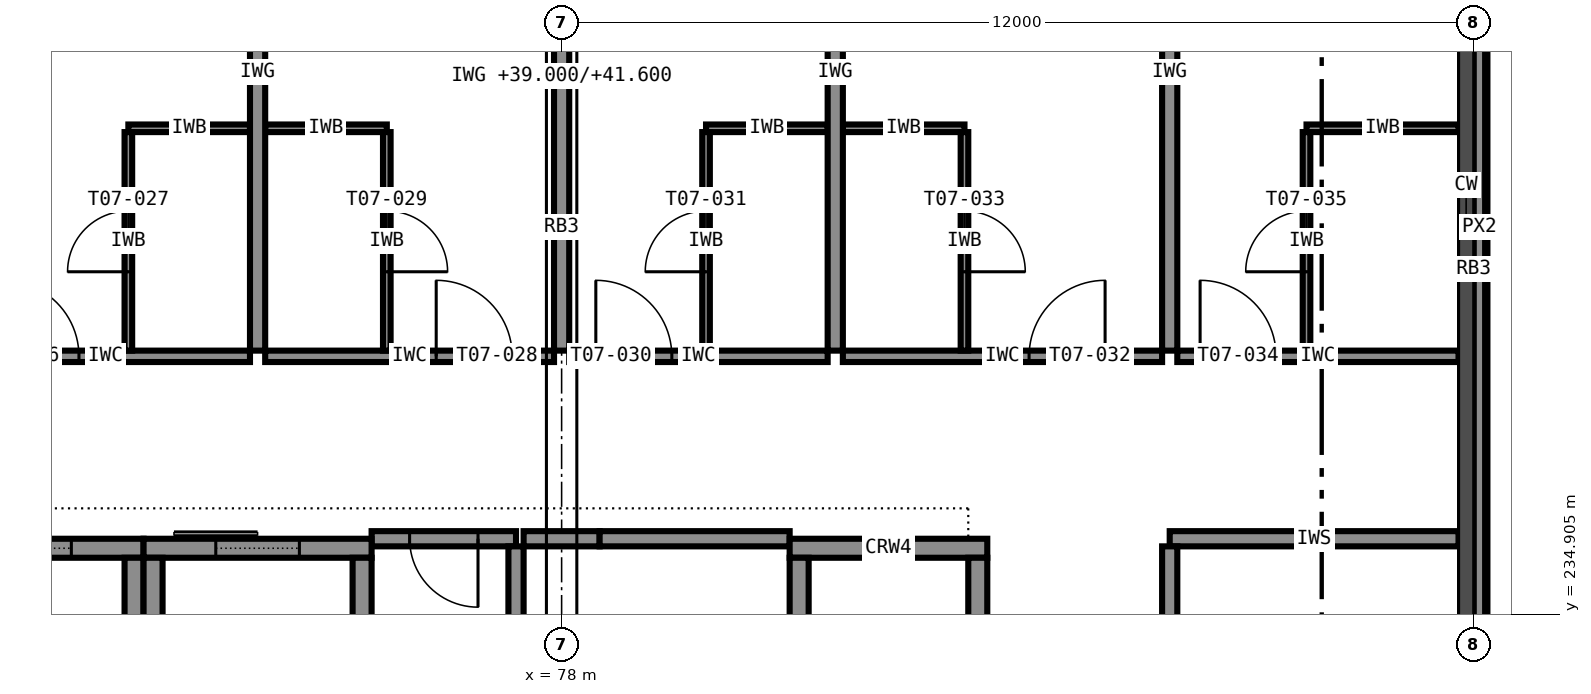
"""IFC4 building model, lengths in metres.
Left out: names, types, materials, properties, quantities, classifications, styles, units other than length and angle.
Written with IfcOpenShell. Run it as: python <this file> out.ifc"""

import sys

from ifc_helpers import new_model, si_unit, direction, frame, frame_2d, origin, place, context, subcontext, project, spatial, rectangle, extrude, element, fill, save


model = new_model("IFC4")
c1 = context("Model", 3, precision=1e-05, world=origin(), true_north=direction((0.0, 1.0)))
c2 = subcontext(c1, "Body", "Model", "MODEL_VIEW")
j1 = project(units=[si_unit("LENGTHUNIT", "METRE"), si_unit("PLANEANGLEUNIT", "RADIAN")], contexts=[c1])
p1 = place(None, origin())
s1 = spatial("IfcSite", under=j1, at=p1, CompositionType="ELEMENT")
p2 = place(p1, origin())
s2 = spatial("IfcBuilding", under=s1, at=p2, CompositionType="ELEMENT")
p3 = place(p2, frame((0.0, 0.0, 39.0)))
s3 = spatial("IfcBuildingStorey", under=s2, at=p3, CompositionType="ELEMENT", Elevation=39.0)
p4 = place(p3, frame((69.5, 235.775, 0.0), z_axis=(0.0, 0.0, 1.0), x_axis=(1.0, 0.0, 0.0)))
e1 = element("IfcWall", 1, at=p4, inside=s3, PredefinedType="SHEAR", context=c2, shape_type="SweptSolid", body=[
    extrude(rectangle(XDim=3.0, YDim=0.25, at=frame_2d((1.5, 0.0))), origin(), (0.0, 0.0, 1.0), 3.6),
])
p5 = place(p4, frame((0.95, 0.0, 0.0)))
e2 = element("IfcOpeningElement", 2, at=p5, cuts=e1, PredefinedType="OPENING", context=c2, shape_type="SweptSolid", body=[
    extrude(rectangle(XDim=1.1, YDim=2.1, at=frame_2d((0.55, 1.05))), frame((0.0, 0.135, 0.0), z_axis=(0.0, -1.0, 0.0), x_axis=(1.0, 0.0, 0.0)), (0.0, 0.0, 1.0), 0.27),
])
p6 = place(p3, frame((72.375, 232.35, 0.0), z_axis=(0.0, 0.0, 1.0), x_axis=(0.0, 1.0, 0.0)))
e3 = element("IfcWall", 3, at=p6, inside=s3, PredefinedType="SHEAR", context=c2, shape_type="SweptSolid", body=[
    extrude(rectangle(XDim=3.3, YDim=0.25, at=frame_2d((1.65, 0.0))), origin(), (0.0, 0.0, 1.0), 3.6),
])
p7 = place(p3, frame((72.5, 235.775, 0.0), z_axis=(0.0, 0.0, 1.0), x_axis=(1.0, 0.0, 0.0)))
e4 = element("IfcWall", 4, at=p7, inside=s3, PredefinedType="SHEAR", context=c2, shape_type="SweptSolid", body=[
    extrude(rectangle(XDim=3.0, YDim=0.25, at=frame_2d((1.5, 0.0))), origin(), (0.0, 0.0, 1.0), 3.6),
])
p8 = place(p7, frame((0.95, 0.0, 0.0)))
e5 = element("IfcOpeningElement", 5, at=p8, cuts=e4, PredefinedType="OPENING", context=c2, shape_type="SweptSolid", body=[
    extrude(rectangle(XDim=1.1, YDim=2.1, at=frame_2d((0.55, 1.05))), frame((0.0, 0.135, 0.0), z_axis=(0.0, -1.0, 0.0), x_axis=(1.0, 0.0, 0.0)), (0.0, 0.0, 1.0), 0.27),
])
for number, where, z_axis, x_axis in (
    (6, (72.625, 232.35, 0.0), (0.0, 0.0, 1.0), (0.0, 1.0, 0.0)),
    (7, (75.375, 232.35, 0.0), (0.0, 0.0, 1.0), (0.0, 1.0, 0.0)),
):
    element("IfcWall", number, at=place(p3, frame(where, z_axis=z_axis, x_axis=x_axis)), inside=s3, PredefinedType="SHEAR", context=c2, shape_type="SweptSolid", body=[
        extrude(rectangle(XDim=3.3, YDim=0.25, at=frame_2d((1.65, 0.0))), origin(), (0.0, 0.0, 1.0), 3.6),
    ])
p9 = place(p3, frame((81.0, 235.775, 0.0), z_axis=(0.0, 0.0, 1.0), x_axis=(1.0, 0.0, 0.0)))
e8 = element("IfcWall", 8, at=p9, inside=s3, PredefinedType="SHEAR", context=c2, shape_type="SweptSolid", body=[
    extrude(rectangle(XDim=2.6, YDim=0.25, at=frame_2d((1.3, 0.0))), origin(), (0.0, 0.0, 1.0), 3.6),
])
p10 = place(p3, frame((81.125, 232.35, 0.0), z_axis=(0.0, 0.0, 1.0), x_axis=(0.0, 1.0, 0.0)))
e9 = element("IfcWall", 9, at=p10, inside=s3, PredefinedType="SHEAR", context=c2, shape_type="SweptSolid", body=[
    extrude(rectangle(XDim=3.3, YDim=0.25, at=frame_2d((1.65, 0.0))), origin(), (0.0, 0.0, 1.0), 3.6),
])
p11 = place(p10, frame((1.1, 0.0, 0.0)))
e10 = element("IfcOpeningElement", 10, at=p11, cuts=e9, PredefinedType="OPENING", context=c2, shape_type="SweptSolid", body=[
    extrude(rectangle(XDim=1.1, YDim=2.1, at=frame_2d((0.55, 1.05))), frame((0.0, 0.135, 0.0), z_axis=(0.0, -1.0, 0.0), x_axis=(1.0, 0.0, 0.0)), (0.0, 0.0, 1.0), 0.27),
])
p12 = place(p3, frame((83.475, 232.35, 0.0), z_axis=(0.0, 0.0, 1.0), x_axis=(0.0, 1.0, 0.0)))
e11 = element("IfcWall", 11, at=p12, inside=s3, PredefinedType="SHEAR", context=c2, shape_type="SweptSolid", body=[
    extrude(rectangle(XDim=3.3, YDim=0.25, at=frame_2d((1.65, 0.0))), origin(), (0.0, 0.0, 1.0), 3.6),
])
p13 = place(p3, frame((90.075, 234.4, 3.4), z_axis=(0.0, 0.0, 1.0), x_axis=(0.0, 1.0, 0.0)))
e12 = element("IfcWall", 12, at=p13, inside=s3, PredefinedType="STANDARD", context=c2, shape_type="SweptSolid", body=[
    extrude(rectangle(XDim=11.2, YDim=0.15, at=frame_2d((5.6, 0.0))), origin(), (0.0, 0.0, 1.0), 0.2),
])
p14 = place(p3, frame((77.4, 235.9, 0.0), z_axis=(0.0, 0.0, 1.0), x_axis=(-1.0, 0.0, 0.0)))
e13 = element("IfcWall", 13, at=p14, inside=s3, PredefinedType="PARTITIONING", context=c2, shape_type="SweptSolid", body=[
    extrude(rectangle(XDim=1.9, YDim=0.2, at=frame_2d((0.95, 0.0))), origin(), (0.0, 0.0, 1.0), 3.4),
])
p15 = place(p14, frame((0.5, 0.0, 0.0)))
e14 = element("IfcOpeningElement", 14, at=p15, cuts=e13, PredefinedType="OPENING", context=c2, shape_type="SweptSolid", body=[
    extrude(rectangle(XDim=0.9, YDim=2.1, at=frame_2d((0.45, 1.05))), frame((0.0, 0.11, 0.0), z_axis=(0.0, -1.0, 0.0), x_axis=(1.0, 0.0, 0.0)), (0.0, 0.0, 1.0), 0.22),
])
p16 = place(p3, frame((77.5, 235.9, 0.0), z_axis=(0.0, 0.0, 1.0), x_axis=(1.0, 0.0, 0.0)))
e15 = element("IfcWall", 15, at=p16, inside=s3, PredefinedType="PARTITIONING", context=c2, shape_type="SweptSolid", body=[
    extrude(rectangle(XDim=1.0, YDim=0.2, at=frame_2d((0.5, 0.0))), origin(), (0.0, 0.0, 1.0), 3.4),
])
p17 = place(p3, frame((78.5, 235.9, 0.0), z_axis=(0.0, 0.0, 1.0), x_axis=(1.0, 0.0, 0.0)))
e16 = element("IfcWall", 16, at=p17, inside=s3, PredefinedType="PARTITIONING", context=c2, shape_type="SweptSolid", body=[
    extrude(rectangle(XDim=2.5, YDim=0.2, at=frame_2d((1.25, 0.0))), origin(), (0.0, 0.0, 1.0), 3.4),
])
p18 = place(p3, frame((86.0, 235.9, 0.0), z_axis=(0.0, 0.0, 1.0), x_axis=(1.0, 0.0, 0.0)))
e17 = element("IfcWall", 17, at=p18, inside=s3, PredefinedType="PARTITIONING", context=c2, shape_type="SweptSolid", body=[
    extrude(rectangle(XDim=3.8, YDim=0.2, at=frame_2d((1.9, 0.0))), origin(), (0.0, 0.0, 1.0), 3.4),
])
p19 = place(p3, frame((77.4, 232.2, 0.0), z_axis=(0.0, 0.0, 1.0), x_axis=(0.0, 1.0, 0.0)))
e18 = element("IfcWall", 18, at=p19, inside=s3, PredefinedType="PARTITIONING", context=c2, shape_type="SweptSolid", body=[
    extrude(rectangle(XDim=3.6, YDim=0.2, at=frame_2d((1.8, 0.0))), origin(), (0.0, 0.0, 1.0), 3.4),
])
p20 = place(p3, frame((86.0, 235.8, 0.0), z_axis=(0.0, 0.0, 1.0), x_axis=(0.0, -1.0, 0.0)))
e19 = element("IfcWall", 19, at=p20, inside=s3, PredefinedType="PARTITIONING", context=c2, shape_type="SweptSolid", body=[
    extrude(rectangle(XDim=3.6, YDim=0.2, at=frame_2d((1.8, 0.0))), origin(), (0.0, 0.0, 1.0), 3.4),
])
p21 = place(p20, frame((1.35, 0.0, 0.0)))
e20 = element("IfcOpeningElement", 20, at=p21, cuts=e19, PredefinedType="OPENING", context=c2, shape_type="SweptSolid", body=[
    extrude(rectangle(XDim=0.9, YDim=2.1, at=frame_2d((0.45, 1.05))), frame((0.0, 0.11, 0.0), z_axis=(0.0, -1.0, 0.0), x_axis=(1.0, 0.0, 0.0)), (0.0, 0.0, 1.0), 0.22),
])
p22 = place(p3, frame((70.1, 238.3, 0.0), z_axis=(0.0, 0.0, 1.0), x_axis=(1.0, 0.0, 0.0)))
e21 = element("IfcWall", 21, at=p22, inside=s3, PredefinedType="PARTITIONING", context=c2, shape_type="SweptSolid", body=[
    extrude(rectangle(XDim=3.8, YDim=0.15, at=frame_2d((1.9, 0.0))), origin(), (0.0, 0.0, 1.0), 3.4),
])
p23 = place(p22, frame((0.55, 0.0, 0.0)))
e22 = element("IfcOpeningElement", 22, at=p23, cuts=e21, PredefinedType="OPENING", context=c2, shape_type="SweptSolid", body=[
    extrude(rectangle(XDim=1.0, YDim=2.1, at=frame_2d((0.5, 1.05))), frame((0.0, 0.085, 0.0), z_axis=(0.0, -1.0, 0.0), x_axis=(1.0, 0.0, 0.0)), (0.0, 0.0, 1.0), 0.17),
])
p24 = place(p3, frame((72.3, 241.3, 0.0), z_axis=(0.0, 0.0, 1.0), x_axis=(1.0, 0.0, 0.0)))
e23 = element("IfcWall", 23, at=p24, inside=s3, PredefinedType="PARTITIONING", context=c2, shape_type="SweptSolid", body=[
    extrude(rectangle(XDim=1.6, YDim=0.1, at=frame_2d((0.8, 0.0))), origin(), (0.0, 0.0, 1.0), 3.4),
])
p25 = place(p3, frame((72.3, 238.375, 0.0), z_axis=(0.0, 0.0, 1.0), x_axis=(0.0, 1.0, 0.0)))
e24 = element("IfcWall", 24, at=p25, inside=s3, PredefinedType="PARTITIONING", context=c2, shape_type="SweptSolid", body=[
    extrude(rectangle(XDim=2.875, YDim=0.1, at=frame_2d((1.438, 0.0))), origin(), (0.0, 0.0, 1.0), 3.4),
])
p26 = place(p25, frame((1.038, 0.0, 0.0)))
e25 = element("IfcOpeningElement", 25, at=p26, cuts=e24, PredefinedType="OPENING", context=c2, shape_type="SweptSolid", body=[
    extrude(rectangle(XDim=0.8, YDim=2.1, at=frame_2d((0.4, 1.05))), frame((0.0, 0.06, 0.0), z_axis=(0.0, -1.0, 0.0), x_axis=(1.0, 0.0, 0.0)), (0.0, 0.0, 1.0), 0.12),
])
p27 = place(p3, frame((74.1, 238.3, 0.0), z_axis=(0.0, 0.0, 1.0), x_axis=(1.0, 0.0, 0.0)))
e26 = element("IfcWall", 26, at=p27, inside=s3, PredefinedType="PARTITIONING", context=c2, shape_type="SweptSolid", body=[
    extrude(rectangle(XDim=3.8, YDim=0.15, at=frame_2d((1.9, 0.0))), origin(), (0.0, 0.0, 1.0), 3.4),
])
p28 = place(p27, frame((2.25, 0.0, 0.0)))
e27 = element("IfcOpeningElement", 27, at=p28, cuts=e26, PredefinedType="OPENING", context=c2, shape_type="SweptSolid", body=[
    extrude(rectangle(XDim=1.0, YDim=2.1, at=frame_2d((0.5, 1.05))), frame((0.0, 0.085, 0.0), z_axis=(0.0, -1.0, 0.0), x_axis=(1.0, 0.0, 0.0)), (0.0, 0.0, 1.0), 0.17),
])
p29 = place(p3, frame((74.1, 241.3, 0.0), z_axis=(0.0, 0.0, 1.0), x_axis=(1.0, 0.0, 0.0)))
e28 = element("IfcWall", 28, at=p29, inside=s3, PredefinedType="PARTITIONING", context=c2, shape_type="SweptSolid", body=[
    extrude(rectangle(XDim=1.6, YDim=0.1, at=frame_2d((0.8, 0.0))), origin(), (0.0, 0.0, 1.0), 3.4),
])
p30 = place(p3, frame((75.7, 241.25, 0.0), z_axis=(0.0, 0.0, 1.0), x_axis=(0.0, -1.0, 0.0)))
e29 = element("IfcWall", 29, at=p30, inside=s3, PredefinedType="PARTITIONING", context=c2, shape_type="SweptSolid", body=[
    extrude(rectangle(XDim=2.875, YDim=0.1, at=frame_2d((1.438, 0.0))), origin(), (0.0, 0.0, 1.0), 3.4),
])
p31 = place(p30, frame((1.038, 0.0, 0.0)))
e30 = element("IfcOpeningElement", 30, at=p31, cuts=e29, PredefinedType="OPENING", context=c2, shape_type="SweptSolid", body=[
    extrude(rectangle(XDim=0.8, YDim=2.1, at=frame_2d((0.4, 1.05))), frame((0.0, 0.06, 0.0), z_axis=(0.0, -1.0, 0.0), x_axis=(1.0, 0.0, 0.0)), (0.0, 0.0, 1.0), 0.12),
])
p32 = place(p3, frame((78.1, 238.3, 0.0), z_axis=(0.0, 0.0, 1.0), x_axis=(1.0, 0.0, 0.0)))
e31 = element("IfcWall", 31, at=p32, inside=s3, PredefinedType="PARTITIONING", context=c2, shape_type="SweptSolid", body=[
    extrude(rectangle(XDim=3.4, YDim=0.15, at=frame_2d((1.7, 0.0))), origin(), (0.0, 0.0, 1.0), 3.4),
])
p33 = place(p32, frame((0.35, 0.0, 0.0)))
e32 = element("IfcOpeningElement", 32, at=p33, cuts=e31, PredefinedType="OPENING", context=c2, shape_type="SweptSolid", body=[
    extrude(rectangle(XDim=1.0, YDim=2.1, at=frame_2d((0.5, 1.05))), frame((0.0, 0.085, 0.0), z_axis=(0.0, -1.0, 0.0), x_axis=(1.0, 0.0, 0.0)), (0.0, 0.0, 1.0), 0.17),
])
p34 = place(p3, frame((79.9, 241.3, 0.0), z_axis=(0.0, 0.0, 1.0), x_axis=(1.0, 0.0, 0.0)))
e33 = element("IfcWall", 33, at=p34, inside=s3, PredefinedType="PARTITIONING", context=c2, shape_type="SweptSolid", body=[
    extrude(rectangle(XDim=1.6, YDim=0.1, at=frame_2d((0.8, 0.0))), origin(), (0.0, 0.0, 1.0), 3.4),
])
p35 = place(p3, frame((79.9, 238.375, 0.0), z_axis=(0.0, 0.0, 1.0), x_axis=(0.0, 1.0, 0.0)))
e34 = element("IfcWall", 34, at=p35, inside=s3, PredefinedType="PARTITIONING", context=c2, shape_type="SweptSolid", body=[
    extrude(rectangle(XDim=2.875, YDim=0.1, at=frame_2d((1.438, 0.0))), origin(), (0.0, 0.0, 1.0), 3.4),
])
p36 = place(p35, frame((1.038, 0.0, 0.0)))
e35 = element("IfcOpeningElement", 35, at=p36, cuts=e34, PredefinedType="OPENING", context=c2, shape_type="SweptSolid", body=[
    extrude(rectangle(XDim=0.8, YDim=2.1, at=frame_2d((0.4, 1.05))), frame((0.0, 0.06, 0.0), z_axis=(0.0, -1.0, 0.0), x_axis=(1.0, 0.0, 0.0)), (0.0, 0.0, 1.0), 0.12),
])
p37 = place(p3, frame((81.7, 238.3, 0.0), z_axis=(0.0, 0.0, 1.0), x_axis=(1.0, 0.0, 0.0)))
e36 = element("IfcWall", 36, at=p37, inside=s3, PredefinedType="PARTITIONING", context=c2, shape_type="SweptSolid", body=[
    extrude(rectangle(XDim=4.2, YDim=0.15, at=frame_2d((2.1, 0.0))), origin(), (0.0, 0.0, 1.0), 3.4),
])
p38 = place(p37, frame((2.45, 0.0, 0.0)))
e37 = element("IfcOpeningElement", 37, at=p38, cuts=e36, PredefinedType="OPENING", context=c2, shape_type="SweptSolid", body=[
    extrude(rectangle(XDim=1.0, YDim=2.1, at=frame_2d((0.5, 1.05))), frame((0.0, 0.085, 0.0), z_axis=(0.0, -1.0, 0.0), x_axis=(1.0, 0.0, 0.0)), (0.0, 0.0, 1.0), 0.17),
])
p39 = place(p3, frame((81.7, 241.3, 0.0), z_axis=(0.0, 0.0, 1.0), x_axis=(1.0, 0.0, 0.0)))
e38 = element("IfcWall", 38, at=p39, inside=s3, PredefinedType="PARTITIONING", context=c2, shape_type="SweptSolid", body=[
    extrude(rectangle(XDim=1.6, YDim=0.1, at=frame_2d((0.8, 0.0))), origin(), (0.0, 0.0, 1.0), 3.4),
])
p40 = place(p3, frame((83.3, 241.25, 0.0), z_axis=(0.0, 0.0, 1.0), x_axis=(0.0, -1.0, 0.0)))
e39 = element("IfcWall", 39, at=p40, inside=s3, PredefinedType="PARTITIONING", context=c2, shape_type="SweptSolid", body=[
    extrude(rectangle(XDim=2.875, YDim=0.1, at=frame_2d((1.438, 0.0))), origin(), (0.0, 0.0, 1.0), 3.4),
])
p41 = place(p40, frame((1.038, 0.0, 0.0)))
e40 = element("IfcOpeningElement", 40, at=p41, cuts=e39, PredefinedType="OPENING", context=c2, shape_type="SweptSolid", body=[
    extrude(rectangle(XDim=0.8, YDim=2.1, at=frame_2d((0.4, 1.05))), frame((0.0, 0.06, 0.0), z_axis=(0.0, -1.0, 0.0), x_axis=(1.0, 0.0, 0.0)), (0.0, 0.0, 1.0), 0.12),
])
p42 = place(p3, frame((86.1, 238.3, 0.0), z_axis=(0.0, 0.0, 1.0), x_axis=(1.0, 0.0, 0.0)))
e41 = element("IfcWall", 41, at=p42, inside=s3, PredefinedType="PARTITIONING", context=c2, shape_type="SweptSolid", body=[
    extrude(rectangle(XDim=3.7, YDim=0.15, at=frame_2d((1.85, 0.0))), origin(), (0.0, 0.0, 1.0), 3.4),
])
p43 = place(p42, frame((0.3, 0.0, 0.0)))
e42 = element("IfcOpeningElement", 42, at=p43, cuts=e41, PredefinedType="OPENING", context=c2, shape_type="SweptSolid", body=[
    extrude(rectangle(XDim=1.0, YDim=2.1, at=frame_2d((0.5, 1.05))), frame((0.0, 0.085, 0.0), z_axis=(0.0, -1.0, 0.0), x_axis=(1.0, 0.0, 0.0)), (0.0, 0.0, 1.0), 0.17),
])
p44 = place(p3, frame((87.8, 241.3, 0.0), z_axis=(0.0, 0.0, 1.0), x_axis=(1.0, 0.0, 0.0)))
e43 = element("IfcWall", 43, at=p44, inside=s3, PredefinedType="PARTITIONING", context=c2, shape_type="SweptSolid", body=[
    extrude(rectangle(XDim=2.0, YDim=0.1, at=frame_2d((1.0, 0.0))), origin(), (0.0, 0.0, 1.0), 3.4),
])
p45 = place(p3, frame((87.8, 238.375, 0.0), z_axis=(0.0, 0.0, 1.0), x_axis=(0.0, 1.0, 0.0)))
e44 = element("IfcWall", 44, at=p45, inside=s3, PredefinedType="PARTITIONING", context=c2, shape_type="SweptSolid", body=[
    extrude(rectangle(XDim=2.875, YDim=0.1, at=frame_2d((1.438, 0.0))), origin(), (0.0, 0.0, 1.0), 3.4),
])
p46 = place(p45, frame((1.038, 0.0, 0.0)))
e45 = element("IfcOpeningElement", 45, at=p46, cuts=e44, PredefinedType="OPENING", context=c2, shape_type="SweptSolid", body=[
    extrude(rectangle(XDim=0.8, YDim=2.1, at=frame_2d((0.4, 1.05))), frame((0.0, 0.06, 0.0), z_axis=(0.0, -1.0, 0.0), x_axis=(1.0, 0.0, 0.0)), (0.0, 0.0, 1.0), 0.12),
])
p47 = place(p3, frame((74.0, 245.7, 0.0), z_axis=(0.0, 0.0, 1.0), x_axis=(0.0, -1.0, 0.0)))
e46 = element("IfcWall", 46, at=p47, inside=s3, PredefinedType="PARTITIONING", context=c2, shape_type="SweptSolid", body=[
    extrude(rectangle(XDim=7.325, YDim=0.2, at=frame_2d((3.663, 0.0))), origin(), (0.0, 0.0, 1.0), 3.4),
])
p48 = place(p3, frame((78.0, 245.6, 0.0), z_axis=(0.0, 0.0, 1.0), x_axis=(0.0, -1.0, 0.0)))
e47 = element("IfcWall", 47, at=p48, inside=s3, PredefinedType="PARTITIONING", context=c2, shape_type="SweptSolid", body=[
    extrude(rectangle(XDim=7.225, YDim=0.2, at=frame_2d((3.613, 0.0))), origin(), (0.0, 0.0, 1.0), 2.6),
])
for number, where, z_axis, x_axis in (
    (48, (81.6, 245.7, 0.0), (0.0, 0.0, 1.0), (0.0, -1.0, 0.0)),
    (49, (86.0, 245.7, 0.0), (0.0, 0.0, 1.0), (0.0, -1.0, 0.0)),
):
    element("IfcWall", number, at=place(p3, frame(where, z_axis=z_axis, x_axis=x_axis)), inside=s3, PredefinedType="PARTITIONING", context=c2, shape_type="SweptSolid", body=[
        extrude(rectangle(XDim=7.325, YDim=0.2, at=frame_2d((3.663, 0.0))), origin(), (0.0, 0.0, 1.0), 3.4),
    ])
p49 = place(p15, origin())
e50 = element("IfcDoor", 50, at=p49, inside=s3, OperationType="SINGLE_SWING_LEFT", PredefinedType="DOOR", context=c2, shape_type="SweptSolid", body=[
    extrude(rectangle(XDim=0.9, YDim=2.1, at=frame_2d((0.45, 1.05))), frame((0.0, 0.025, 0.0), z_axis=(0.0, -1.0, 0.0), x_axis=(1.0, 0.0, 0.0)), (0.0, 0.0, 1.0), 0.05),
])
fill(e14, e50)
p50 = place(p23, origin())
e51 = element("IfcDoor", 51, at=p50, inside=s3, OperationType="SINGLE_SWING_LEFT", PredefinedType="DOOR", context=c2, shape_type="SweptSolid", body=[
    extrude(rectangle(XDim=1.0, YDim=2.1, at=frame_2d((0.5, 1.05))), frame((0.0, 0.025, 0.0), z_axis=(0.0, -1.0, 0.0), x_axis=(1.0, 0.0, 0.0)), (0.0, 0.0, 1.0), 0.05),
])
fill(e22, e51)
p51 = place(p26, origin())
e52 = element("IfcDoor", 52, at=p51, inside=s3, OperationType="SINGLE_SWING_LEFT", PredefinedType="DOOR", context=c2, shape_type="SweptSolid", body=[
    extrude(rectangle(XDim=0.8, YDim=2.1, at=frame_2d((0.4, 1.05))), frame((0.0, 0.025, 0.0), z_axis=(0.0, -1.0, 0.0), x_axis=(1.0, 0.0, 0.0)), (0.0, 0.0, 1.0), 0.05),
])
fill(e25, e52)
p52 = place(p28, origin())
e53 = element("IfcDoor", 53, at=p52, inside=s3, OperationType="SINGLE_SWING_LEFT", PredefinedType="DOOR", context=c2, shape_type="SweptSolid", body=[
    extrude(rectangle(XDim=1.0, YDim=2.1, at=frame_2d((0.5, 1.05))), frame((0.0, 0.025, 0.0), z_axis=(0.0, -1.0, 0.0), x_axis=(1.0, 0.0, 0.0)), (0.0, 0.0, 1.0), 0.05),
])
fill(e27, e53)
p53 = place(p31, origin())
e54 = element("IfcDoor", 54, at=p53, inside=s3, OperationType="SINGLE_SWING_RIGHT", PredefinedType="DOOR", context=c2, shape_type="SweptSolid", body=[
    extrude(rectangle(XDim=0.8, YDim=2.1, at=frame_2d((0.4, 1.05))), frame((0.0, 0.025, 0.0), z_axis=(0.0, -1.0, 0.0), x_axis=(1.0, 0.0, 0.0)), (0.0, 0.0, 1.0), 0.05),
])
fill(e30, e54)
p54 = place(p33, origin())
e55 = element("IfcDoor", 55, at=p54, inside=s3, OperationType="SINGLE_SWING_LEFT", PredefinedType="DOOR", context=c2, shape_type="SweptSolid", body=[
    extrude(rectangle(XDim=1.0, YDim=2.1, at=frame_2d((0.5, 1.05))), frame((0.0, 0.025, 0.0), z_axis=(0.0, -1.0, 0.0), x_axis=(1.0, 0.0, 0.0)), (0.0, 0.0, 1.0), 0.05),
])
fill(e32, e55)
p55 = place(p36, origin())
e56 = element("IfcDoor", 56, at=p55, inside=s3, OperationType="SINGLE_SWING_LEFT", PredefinedType="DOOR", context=c2, shape_type="SweptSolid", body=[
    extrude(rectangle(XDim=0.8, YDim=2.1, at=frame_2d((0.4, 1.05))), frame((0.0, 0.025, 0.0), z_axis=(0.0, -1.0, 0.0), x_axis=(1.0, 0.0, 0.0)), (0.0, 0.0, 1.0), 0.05),
])
fill(e35, e56)
p56 = place(p38, origin())
e57 = element("IfcDoor", 57, at=p56, inside=s3, OperationType="SINGLE_SWING_RIGHT", PredefinedType="DOOR", context=c2, shape_type="SweptSolid", body=[
    extrude(rectangle(XDim=1.0, YDim=2.1, at=frame_2d((0.5, 1.05))), frame((0.0, 0.025, 0.0), z_axis=(0.0, -1.0, 0.0), x_axis=(1.0, 0.0, 0.0)), (0.0, 0.0, 1.0), 0.05),
])
fill(e37, e57)
p57 = place(p41, origin())
e58 = element("IfcDoor", 58, at=p57, inside=s3, OperationType="SINGLE_SWING_RIGHT", PredefinedType="DOOR", context=c2, shape_type="SweptSolid", body=[
    extrude(rectangle(XDim=0.8, YDim=2.1, at=frame_2d((0.4, 1.05))), frame((0.0, 0.025, 0.0), z_axis=(0.0, -1.0, 0.0), x_axis=(1.0, 0.0, 0.0)), (0.0, 0.0, 1.0), 0.05),
])
fill(e40, e58)
p58 = place(p43, origin())
e59 = element("IfcDoor", 59, at=p58, inside=s3, OperationType="SINGLE_SWING_LEFT", PredefinedType="DOOR", context=c2, shape_type="SweptSolid", body=[
    extrude(rectangle(XDim=1.0, YDim=2.1, at=frame_2d((0.5, 1.05))), frame((0.0, 0.025, 0.0), z_axis=(0.0, -1.0, 0.0), x_axis=(1.0, 0.0, 0.0)), (0.0, 0.0, 1.0), 0.05),
])
fill(e42, e59)
p59 = place(p46, origin())
e60 = element("IfcDoor", 60, at=p59, inside=s3, OperationType="SINGLE_SWING_LEFT", PredefinedType="DOOR", context=c2, shape_type="SweptSolid", body=[
    extrude(rectangle(XDim=0.8, YDim=2.1, at=frame_2d((0.4, 1.05))), frame((0.0, 0.025, 0.0), z_axis=(0.0, -1.0, 0.0), x_axis=(1.0, 0.0, 0.0)), (0.0, 0.0, 1.0), 0.05),
])
fill(e45, e60)
p60 = place(p5, origin())
e61 = element("IfcDoor", 61, at=p60, inside=s3, OperationType="SLIDING_TO_LEFT", PredefinedType="DOOR", context=c2, shape_type="SweptSolid", body=[
    extrude(rectangle(XDim=1.1, YDim=2.1, at=frame_2d((0.55, 1.05))), frame((0.0, 0.025, 0.0), z_axis=(0.0, -1.0, 0.0), x_axis=(1.0, 0.0, 0.0)), (0.0, 0.0, 1.0), 0.05),
])
fill(e2, e61)
p61 = place(p8, origin())
e62 = element("IfcDoor", 62, at=p61, inside=s3, OperationType="SLIDING_TO_LEFT", PredefinedType="DOOR", context=c2, shape_type="SweptSolid", body=[
    extrude(rectangle(XDim=1.1, YDim=2.1, at=frame_2d((0.55, 1.05))), frame((0.0, 0.025, 0.0), z_axis=(0.0, -1.0, 0.0), x_axis=(1.0, 0.0, 0.0)), (0.0, 0.0, 1.0), 0.05),
])
fill(e5, e62)
save(model, sys.argv[1])
